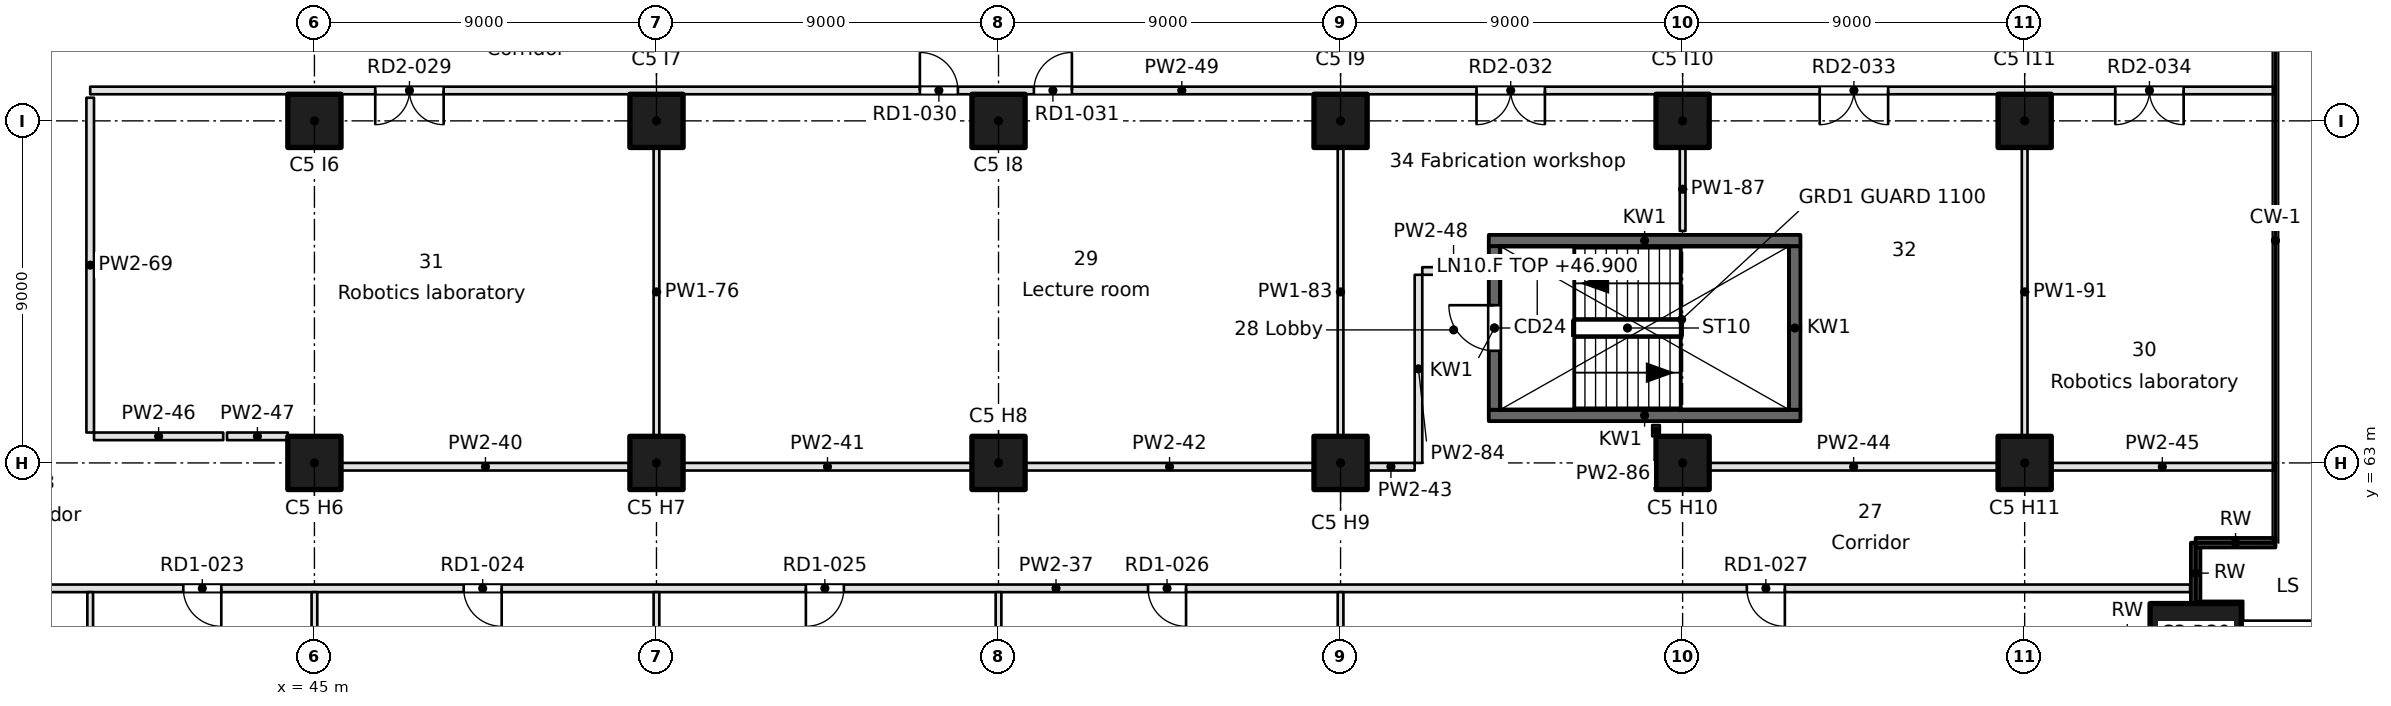
"""IFC4 building model, lengths in metres.
Left out: names, types, materials, properties, quantities, classifications, styles, units other than length and angle.
Written with IfcOpenShell. Run it as: python <this file> out.ifc"""

import sys

from ifc_helpers import new_model, si_unit, direction, frame, frame_2d, origin, origin_2d, place, context, subcontext, project, spatial, rectangle, extrude, element, fill, save


model = new_model("IFC4")
c1 = context("Model", 3, precision=1e-05, world=origin(), true_north=direction((0.0, 1.0)))
c2 = subcontext(c1, "Body", "Model", "MODEL_VIEW")
j1 = project(units=[si_unit("LENGTHUNIT", "METRE"), si_unit("PLANEANGLEUNIT", "RADIAN")], contexts=[c1])
p1 = place(None, origin())
s1 = spatial("IfcSite", under=j1, at=p1, CompositionType="ELEMENT")
p2 = place(p1, origin())
s2 = spatial("IfcBuilding", under=s1, at=p2, CompositionType="ELEMENT")
p3 = place(p2, frame((0.0, 0.0, 46.9)))
s3 = spatial("IfcBuildingStorey", under=s2, at=p3, CompositionType="ELEMENT", Elevation=46.9)
p4 = place(p3, frame((94.5, 58.5, 0.0), z_axis=(0.0, 0.0, 1.0), x_axis=(1.0, 0.0, 0.0)))
e1 = element("IfcColumn", 1, at=p4, inside=s3, PredefinedType="COLUMN", context=c2, shape_type="SweptSolid", body=[
    extrude(rectangle(XDim=2.4, YDim=1.6, at=origin_2d()), origin(), (0.0, 0.0, 1.0), 3.7),
])
for number, where, z_axis, x_axis in (
    (2, (45.0, 63.0, 0.0), (0.0, 0.0, 1.0), (1.0, 0.0, 0.0)),
    (3, (45.0, 72.0, 0.0), (0.0, 0.0, 1.0), (1.0, 0.0, 0.0)),
    (4, (54.0, 63.0, 0.0), (0.0, 0.0, 1.0), (1.0, 0.0, 0.0)),
    (5, (54.0, 72.0, 0.0), (0.0, 0.0, 1.0), (1.0, 0.0, 0.0)),
    (6, (63.0, 63.0, 0.0), (0.0, 0.0, 1.0), (1.0, 0.0, 0.0)),
    (7, (63.0, 72.0, 0.0), (0.0, 0.0, 1.0), (1.0, 0.0, 0.0)),
    (8, (72.0, 63.0, 0.0), (0.0, 0.0, 1.0), (1.0, 0.0, 0.0)),
    (9, (72.0, 72.0, 0.0), (0.0, 0.0, 1.0), (1.0, 0.0, 0.0)),
    (10, (81.0, 63.0, 0.0), (0.0, 0.0, 1.0), (1.0, 0.0, 0.0)),
    (11, (81.0, 72.0, 0.0), (0.0, 0.0, 1.0), (1.0, 0.0, 0.0)),
    (12, (90.0, 63.0, 0.0), (0.0, 0.0, 1.0), (1.0, 0.0, 0.0)),
    (13, (90.0, 72.0, 0.0), (0.0, 0.0, 1.0), (1.0, 0.0, 0.0)),
):
    element("IfcColumn", number, at=place(p3, frame(where, z_axis=z_axis, x_axis=x_axis)), inside=s3, PredefinedType="COLUMN", context=c2, shape_type="SweptSolid", body=[
        extrude(rectangle(XDim=1.4, YDim=1.4, at=origin_2d()), origin(), (0.0, 0.0, 1.0), 3.7),
    ])
p5 = place(p3, frame((94.499, 59.3, 0.0), z_axis=(0.0, 0.0, 1.0), x_axis=(0.00015253203, 0.999999988367, 0.0)))
e14 = element("IfcWall", 14, at=p5, inside=s3, PredefinedType="SOLIDWALL", context=c2, shape_type="SweptSolid", body=[
    extrude(rectangle(XDim=1.601, YDim=0.25, at=frame_2d((0.8, 0.0))), origin(), (0.0, 0.0, 1.0), 3.3),
])
p6 = place(p3, frame((94.499, 60.901, 0.0), z_axis=(0.0, 0.0, 1.0), x_axis=(0.999999993241, 0.00011626555, 0.0)))
e15 = element("IfcWall", 15, at=p6, inside=s3, PredefinedType="SOLIDWALL", context=c2, shape_type="SweptSolid", body=[
    extrude(rectangle(XDim=2.1, YDim=0.25, at=frame_2d((1.05, 0.0))), origin(), (0.0, 0.0, 1.0), 3.3),
])
for number, where, z_axis, x_axis in (
    (16, (75.9, 64.25, -0.4), (0.0, 0.0, 1.0), (1.0, 0.0, 0.0)),
    (17, (75.9, 68.85, -0.4), (0.0, 0.0, 1.0), (1.0, 0.0, 0.0)),
):
    element("IfcWall", number, at=place(p3, frame(where, z_axis=z_axis, x_axis=x_axis)), inside=s3, PredefinedType="SOLIDWALL", context=c2, shape_type="SweptSolid", body=[
        extrude(rectangle(XDim=8.2, YDim=0.3, at=frame_2d((4.1, 0.0))), origin(), (0.0, 0.0, 1.0), 3.7),
    ])
p7 = place(p3, frame((76.05, 64.4, -0.4), z_axis=(0.0, 0.0, 1.0), x_axis=(0.0, 1.0, 0.0)))
e18 = element("IfcWall", 18, at=p7, inside=s3, PredefinedType="SOLIDWALL", context=c2, shape_type="SweptSolid", body=[
    extrude(rectangle(XDim=4.3, YDim=0.3, at=frame_2d((2.15, 0.0))), origin(), (0.0, 0.0, 1.0), 3.7),
])
p8 = place(p7, frame((1.55, 0.0, 0.4)))
e19 = element("IfcOpeningElement", 19, at=p8, cuts=e18, PredefinedType="OPENING", context=c2, shape_type="SweptSolid", body=[
    extrude(rectangle(XDim=1.2, YDim=2.1, at=frame_2d((0.6, 1.05))), frame((0.0, 0.15, 0.0), z_axis=(0.0, -1.0, 0.0), x_axis=(1.0, 0.0, 0.0)), (0.0, 0.0, 1.0), 0.3),
])
p9 = place(p3, frame((83.95, 64.4, -0.4), z_axis=(0.0, 0.0, 1.0), x_axis=(0.0, 1.0, 0.0)))
e20 = element("IfcWall", 20, at=p9, inside=s3, PredefinedType="SOLIDWALL", context=c2, shape_type="SweptSolid", body=[
    extrude(rectangle(XDim=4.3, YDim=0.3, at=frame_2d((2.15, 0.0))), origin(), (0.0, 0.0, 1.0), 3.7),
])
p10 = place(p3, frame((94.354, 59.7, 0.0), z_axis=(0.0, 0.0, 1.0), x_axis=(-1.0, 0.0, 0.0)))
e21 = element("IfcWall", 21, at=p10, inside=s3, PredefinedType="PARTITIONING", context=c2, shape_type="SweptSolid", body=[
    extrude(rectangle(XDim=59.682, YDim=0.2, at=frame_2d((29.841, 0.0))), origin(), (0.0, 0.0, 1.0), 3.3),
])
p11 = place(p10, frame((51.805, 0.0, 0.0)))
e22 = element("IfcOpeningElement", 22, at=p11, cuts=e21, PredefinedType="OPENING", context=c2, shape_type="SweptSolid", body=[
    extrude(rectangle(XDim=1.0, YDim=2.1, at=frame_2d((0.5, 1.05))), frame((0.0, 0.1, 0.0), z_axis=(0.0, -1.0, 0.0), x_axis=(1.0, 0.0, 0.0)), (0.0, 0.0, 1.0), 0.2),
])
p12 = place(p10, frame((44.427, 0.0, 0.0)))
e23 = element("IfcOpeningElement", 23, at=p12, cuts=e21, PredefinedType="OPENING", context=c2, shape_type="SweptSolid", body=[
    extrude(rectangle(XDim=1.0, YDim=2.1, at=frame_2d((0.5, 1.05))), frame((0.0, 0.1, 0.0), z_axis=(0.0, -1.0, 0.0), x_axis=(1.0, 0.0, 0.0)), (0.0, 0.0, 1.0), 0.2),
])
p13 = place(p10, frame((35.423, 0.0, 0.0)))
e24 = element("IfcOpeningElement", 24, at=p13, cuts=e21, PredefinedType="OPENING", context=c2, shape_type="SweptSolid", body=[
    extrude(rectangle(XDim=1.0, YDim=2.1, at=frame_2d((0.5, 1.05))), frame((0.0, 0.1, 0.0), z_axis=(0.0, -1.0, 0.0), x_axis=(1.0, 0.0, 0.0)), (0.0, 0.0, 1.0), 0.2),
])
p14 = place(p10, frame((26.42, 0.0, 0.0)))
e25 = element("IfcOpeningElement", 25, at=p14, cuts=e21, PredefinedType="OPENING", context=c2, shape_type="SweptSolid", body=[
    extrude(rectangle(XDim=1.0, YDim=2.1, at=frame_2d((0.5, 1.05))), frame((0.0, 0.1, 0.0), z_axis=(0.0, -1.0, 0.0), x_axis=(1.0, 0.0, 0.0)), (0.0, 0.0, 1.0), 0.2),
])
p15 = place(p10, frame((10.664, 0.0, 0.0)))
e26 = element("IfcOpeningElement", 26, at=p15, cuts=e21, PredefinedType="OPENING", context=c2, shape_type="SweptSolid", body=[
    extrude(rectangle(XDim=1.0, YDim=2.1, at=frame_2d((0.5, 1.05))), frame((0.0, 0.1, 0.0), z_axis=(0.0, -1.0, 0.0), x_axis=(1.0, 0.0, 0.0)), (0.0, 0.0, 1.0), 0.2),
])
for number, where, z_axis, x_axis in (
    (27, (45.7, 62.9, 0.0), (0.0, 0.0, 1.0), (1.0, 0.0, 0.0)),
    (28, (54.7, 62.9, 0.0), (0.0, 0.0, 1.0), (1.0, 0.0, 0.0)),
    (29, (63.7, 62.9, 0.0), (0.0, 0.0, 1.0), (1.0, 0.0, 0.0)),
):
    element("IfcWall", number, at=place(p3, frame(where, z_axis=z_axis, x_axis=x_axis)), inside=s3, PredefinedType="PARTITIONING", context=c2, shape_type="SweptSolid", body=[
        extrude(rectangle(XDim=7.6, YDim=0.2, at=frame_2d((3.8, 0.0))), origin(), (0.0, 0.0, 1.0), 3.3),
    ])
p16 = place(p3, frame((72.7, 62.9, 0.0), z_axis=(0.0, 0.0, 1.0), x_axis=(1.0, 0.0, 0.0)))
e30 = element("IfcWall", 30, at=p16, inside=s3, PredefinedType="PARTITIONING", context=c2, shape_type="SweptSolid", body=[
    extrude(rectangle(XDim=1.25, YDim=0.2, at=frame_2d((0.625, 0.0))), origin(), (0.0, 0.0, 1.0), 3.3),
])
p17 = place(p3, frame((81.7, 62.9, 0.0), z_axis=(0.0, 0.0, 1.0), x_axis=(1.0, 0.0, 0.0)))
e31 = element("IfcWall", 31, at=p17, inside=s3, PredefinedType="PARTITIONING", context=c2, shape_type="SweptSolid", body=[
    extrude(rectangle(XDim=7.6, YDim=0.2, at=frame_2d((3.8, 0.0))), origin(), (0.0, 0.0, 1.0), 3.3),
])
p18 = place(p3, frame((90.7, 62.9, 0.0), z_axis=(0.0, 0.0, 1.0), x_axis=(1.0, 0.0, 0.0)))
e32 = element("IfcWall", 32, at=p18, inside=s3, PredefinedType="PARTITIONING", context=c2, shape_type="SweptSolid", body=[
    extrude(rectangle(XDim=5.845, YDim=0.2, at=frame_2d((2.922, 0.0))), origin(), (0.0, 0.0, 1.0), 3.3),
])
p19 = place(p3, frame((39.2, 63.7, 0.0), z_axis=(0.0, 0.0, 1.0), x_axis=(1.0, 0.0, 0.0)))
e33 = element("IfcWall", 33, at=p19, inside=s3, PredefinedType="PARTITIONING", context=c2, shape_type="SweptSolid", body=[
    extrude(rectangle(XDim=3.4, YDim=0.2, at=frame_2d((1.7, 0.0))), origin(), (0.0, 0.0, 1.0), 3.3),
])
p20 = place(p3, frame((42.7, 63.7, 0.0), z_axis=(0.0, 0.0, 1.0), x_axis=(1.0, 0.0, 0.0)))
e34 = element("IfcWall", 34, at=p20, inside=s3, PredefinedType="PARTITIONING", context=c2, shape_type="SweptSolid", body=[
    extrude(rectangle(XDim=1.6, YDim=0.2, at=frame_2d((0.8, 0.0))), origin(), (0.0, 0.0, 1.0), 3.3),
])
p21 = place(p3, frame((74.15, 68.05, 0.0), z_axis=(0.0, 0.0, 1.0), x_axis=(1.0, 0.0, 0.0)))
e35 = element("IfcWall", 35, at=p21, inside=s3, PredefinedType="PARTITIONING", context=c2, shape_type="SweptSolid", body=[
    extrude(rectangle(XDim=1.646, YDim=0.2, at=frame_2d((0.823, 0.0))), origin(), (0.0, 0.0, 1.0), 3.3),
])
p22 = place(p3, frame((96.545, 72.8, 0.0), z_axis=(0.0, 0.0, 1.0), x_axis=(-1.0, 0.0, 0.0)))
e36 = element("IfcWall", 36, at=p22, inside=s3, PredefinedType="PARTITIONING", context=c2, shape_type="SweptSolid", body=[
    extrude(rectangle(XDim=57.445, YDim=0.2, at=frame_2d((28.722, 0.0))), origin(), (0.0, 0.0, 1.0), 3.3),
])
p23 = place(p22, frame((48.145, 0.0, 0.0)))
e37 = element("IfcOpeningElement", 37, at=p23, cuts=e36, PredefinedType="OPENING", context=c2, shape_type="SweptSolid", body=[
    extrude(rectangle(XDim=1.8, YDim=2.1, at=frame_2d((0.9, 1.05))), frame((0.0, 0.1, 0.0), z_axis=(0.0, -1.0, 0.0), x_axis=(1.0, 0.0, 0.0)), (0.0, 0.0, 1.0), 0.2),
])
p24 = place(p22, frame((34.614, 0.0, 0.0)))
e38 = element("IfcOpeningElement", 38, at=p24, cuts=e36, PredefinedType="OPENING", context=c2, shape_type="SweptSolid", body=[
    extrude(rectangle(XDim=1.0, YDim=2.1, at=frame_2d((0.5, 1.05))), frame((0.0, 0.1, 0.0), z_axis=(0.0, -1.0, 0.0), x_axis=(1.0, 0.0, 0.0)), (0.0, 0.0, 1.0), 0.2),
])
p25 = place(p22, frame((31.614, 0.0, 0.0)))
e39 = element("IfcOpeningElement", 39, at=p25, cuts=e36, PredefinedType="OPENING", context=c2, shape_type="SweptSolid", body=[
    extrude(rectangle(XDim=1.0, YDim=2.1, at=frame_2d((0.5, 1.05))), frame((0.0, 0.1, 0.0), z_axis=(0.0, -1.0, 0.0), x_axis=(1.0, 0.0, 0.0)), (0.0, 0.0, 1.0), 0.2),
])
p26 = place(p22, frame((19.168, 0.0, 0.0)))
e40 = element("IfcOpeningElement", 40, at=p26, cuts=e36, PredefinedType="OPENING", context=c2, shape_type="SweptSolid", body=[
    extrude(rectangle(XDim=1.8, YDim=2.1, at=frame_2d((0.9, 1.05))), frame((0.0, 0.1, 0.0), z_axis=(0.0, -1.0, 0.0), x_axis=(1.0, 0.0, 0.0)), (0.0, 0.0, 1.0), 0.2),
])
p27 = place(p22, frame((10.137, 0.0, 0.0)))
e41 = element("IfcOpeningElement", 41, at=p27, cuts=e36, PredefinedType="OPENING", context=c2, shape_type="SweptSolid", body=[
    extrude(rectangle(XDim=1.8, YDim=2.1, at=frame_2d((0.9, 1.05))), frame((0.0, 0.1, 0.0), z_axis=(0.0, -1.0, 0.0), x_axis=(1.0, 0.0, 0.0)), (0.0, 0.0, 1.0), 0.2),
])
p28 = place(p22, frame((2.361, 0.0, 0.0)))
e42 = element("IfcOpeningElement", 42, at=p28, cuts=e36, PredefinedType="OPENING", context=c2, shape_type="SweptSolid", body=[
    extrude(rectangle(XDim=1.8, YDim=2.1, at=frame_2d((0.9, 1.05))), frame((0.0, 0.1, 0.0), z_axis=(0.0, -1.0, 0.0), x_axis=(1.0, 0.0, 0.0)), (0.0, 0.0, 1.0), 0.2),
])
p29 = place(p3, frame((39.1, 59.6, 0.0), z_axis=(0.0, 0.0, 1.0), x_axis=(0.0, -1.0, 0.0)))
e43 = element("IfcWall", 43, at=p29, inside=s3, PredefinedType="PARTITIONING", context=c2, shape_type="SweptSolid", body=[
    extrude(rectangle(XDim=5.525, YDim=0.15, at=frame_2d((2.763, 0.0))), origin(), (0.0, 0.0, 1.0), 3.3),
])
p30 = place(p3, frame((39.1, 72.609, 0.0), z_axis=(0.0, 0.0, 1.0), x_axis=(0.0, -1.0, 0.0)))
e44 = element("IfcWall", 44, at=p30, inside=s3, PredefinedType="PARTITIONING", context=c2, shape_type="SweptSolid", body=[
    extrude(rectangle(XDim=8.809, YDim=0.2, at=frame_2d((4.404, 0.0))), origin(), (0.0, 0.0, 1.0), 3.3),
])
for number, where, z_axis, x_axis in (
    (45, (45.0, 59.6, 0.0), (0.0, 0.0, 1.0), (0.0, -1.0, 0.0)),
    (46, (54.0, 59.6, 0.0), (0.0, 0.0, 1.0), (0.0, -1.0, 0.0)),
):
    element("IfcWall", number, at=place(p3, frame(where, z_axis=z_axis, x_axis=x_axis)), inside=s3, PredefinedType="PARTITIONING", context=c2, shape_type="SweptSolid", body=[
        extrude(rectangle(XDim=3.145, YDim=0.15, at=frame_2d((1.573, 0.0))), origin(), (0.0, 0.0, 1.0), 3.3),
    ])
p31 = place(p3, frame((54.0, 71.3, 0.0), z_axis=(0.0, 0.0, 1.0), x_axis=(0.0, -1.0, 0.0)))
e47 = element("IfcWall", 47, at=p31, inside=s3, PredefinedType="PARTITIONING", context=c2, shape_type="SweptSolid", body=[
    extrude(rectangle(XDim=7.6, YDim=0.15, at=frame_2d((3.8, 0.0))), origin(), (0.0, 0.0, 1.0), 3.3),
])
for number, where, z_axis, x_axis in (
    (48, (63.0, 59.6, 0.0), (0.0, 0.0, 1.0), (0.0, -1.0, 0.0)),
    (49, (72.0, 59.6, 0.0), (0.0, 0.0, 1.0), (0.0, -1.0, 0.0)),
):
    element("IfcWall", number, at=place(p3, frame(where, z_axis=z_axis, x_axis=x_axis)), inside=s3, PredefinedType="PARTITIONING", context=c2, shape_type="SweptSolid", body=[
        extrude(rectangle(XDim=3.145, YDim=0.15, at=frame_2d((1.573, 0.0))), origin(), (0.0, 0.0, 1.0), 3.3),
    ])
p32 = place(p3, frame((72.0, 71.3, 0.0), z_axis=(0.0, 0.0, 1.0), x_axis=(0.0, -1.0, 0.0)))
e50 = element("IfcWall", 50, at=p32, inside=s3, PredefinedType="PARTITIONING", context=c2, shape_type="SweptSolid", body=[
    extrude(rectangle(XDim=7.6, YDim=0.15, at=frame_2d((3.8, 0.0))), origin(), (0.0, 0.0, 1.0), 3.3),
])
p33 = place(p3, frame((74.05, 63.0, 0.0), z_axis=(0.0, 0.0, 1.0), x_axis=(0.0, 1.0, 0.0)))
e51 = element("IfcWall", 51, at=p33, inside=s3, PredefinedType="PARTITIONING", context=c2, shape_type="SweptSolid", body=[
    extrude(rectangle(XDim=4.95, YDim=0.2, at=frame_2d((2.475, 0.0))), origin(), (0.0, 0.0, 1.0), 3.3),
])
p34 = place(p3, frame((80.3, 63.996, 0.0), z_axis=(0.0, 0.0, 1.0), x_axis=(0.0, -1.0, 0.0)))
e52 = element("IfcWall", 52, at=p34, inside=s3, PredefinedType="PARTITIONING", context=c2, shape_type="SweptSolid", body=[
    extrude(rectangle(XDim=0.296, YDim=0.2, at=frame_2d((0.148, 0.0))), origin(), (0.0, 0.0, 1.0), 3.3),
])
p35 = place(p3, frame((81.0, 71.3, 0.0), z_axis=(0.0, 0.0, 1.0), x_axis=(0.0, -1.0, 0.0)))
e53 = element("IfcWall", 53, at=p35, inside=s3, PredefinedType="PARTITIONING", context=c2, shape_type="SweptSolid", body=[
    extrude(rectangle(XDim=2.196, YDim=0.15, at=frame_2d((1.098, 0.0))), origin(), (0.0, 0.0, 1.0), 3.3),
])
p36 = place(p3, frame((90.0, 71.3, 0.0), z_axis=(0.0, 0.0, 1.0), x_axis=(0.0, -1.0, 0.0)))
e54 = element("IfcWall", 54, at=p36, inside=s3, PredefinedType="PARTITIONING", context=c2, shape_type="SweptSolid", body=[
    extrude(rectangle(XDim=7.6, YDim=0.15, at=frame_2d((3.8, 0.0))), origin(), (0.0, 0.0, 1.0), 3.3),
])
p37 = place(p8, origin())
e55 = element("IfcDoor", 55, at=p37, inside=s3, OperationType="SINGLE_SWING_RIGHT", PredefinedType="DOOR", context=c2, shape_type="SweptSolid", body=[
    extrude(rectangle(XDim=1.2, YDim=2.1, at=frame_2d((0.6, 1.05))), frame((0.0, 0.025, 0.0), z_axis=(0.0, -1.0, 0.0), x_axis=(1.0, 0.0, 0.0)), (0.0, 0.0, 1.0), 0.05),
])
fill(e19, e55)
p38 = place(p11, origin())
e56 = element("IfcDoor", 56, at=p38, inside=s3, OperationType="SINGLE_SWING_LEFT", PredefinedType="DOOR", context=c2, shape_type="SweptSolid", body=[
    extrude(rectangle(XDim=1.0, YDim=2.1, at=frame_2d((0.5, 1.05))), frame((0.0, 0.025, 0.0), z_axis=(0.0, -1.0, 0.0), x_axis=(1.0, 0.0, 0.0)), (0.0, 0.0, 1.0), 0.05),
])
fill(e22, e56)
p39 = place(p12, origin())
e57 = element("IfcDoor", 57, at=p39, inside=s3, OperationType="SINGLE_SWING_LEFT", PredefinedType="DOOR", context=c2, shape_type="SweptSolid", body=[
    extrude(rectangle(XDim=1.0, YDim=2.1, at=frame_2d((0.5, 1.05))), frame((0.0, 0.025, 0.0), z_axis=(0.0, -1.0, 0.0), x_axis=(1.0, 0.0, 0.0)), (0.0, 0.0, 1.0), 0.05),
])
fill(e23, e57)
p40 = place(p13, origin())
e58 = element("IfcDoor", 58, at=p40, inside=s3, OperationType="SINGLE_SWING_RIGHT", PredefinedType="DOOR", context=c2, shape_type="SweptSolid", body=[
    extrude(rectangle(XDim=1.0, YDim=2.1, at=frame_2d((0.5, 1.05))), frame((0.0, 0.025, 0.0), z_axis=(0.0, -1.0, 0.0), x_axis=(1.0, 0.0, 0.0)), (0.0, 0.0, 1.0), 0.05),
])
fill(e24, e58)
p41 = place(p14, origin())
e59 = element("IfcDoor", 59, at=p41, inside=s3, OperationType="SINGLE_SWING_LEFT", PredefinedType="DOOR", context=c2, shape_type="SweptSolid", body=[
    extrude(rectangle(XDim=1.0, YDim=2.1, at=frame_2d((0.5, 1.05))), frame((0.0, 0.025, 0.0), z_axis=(0.0, -1.0, 0.0), x_axis=(1.0, 0.0, 0.0)), (0.0, 0.0, 1.0), 0.05),
])
fill(e25, e59)
p42 = place(p15, origin())
e60 = element("IfcDoor", 60, at=p42, inside=s3, OperationType="SINGLE_SWING_LEFT", PredefinedType="DOOR", context=c2, shape_type="SweptSolid", body=[
    extrude(rectangle(XDim=1.0, YDim=2.1, at=frame_2d((0.5, 1.05))), frame((0.0, 0.025, 0.0), z_axis=(0.0, -1.0, 0.0), x_axis=(1.0, 0.0, 0.0)), (0.0, 0.0, 1.0), 0.05),
])
fill(e26, e60)
p43 = place(p23, origin())
e61 = element("IfcDoor", 61, at=p43, inside=s3, OperationType="DOUBLE_DOOR_SINGLE_SWING", PredefinedType="DOOR", context=c2, shape_type="SweptSolid", body=[
    extrude(rectangle(XDim=1.8, YDim=2.1, at=frame_2d((0.9, 1.05))), frame((0.0, 0.025, 0.0), z_axis=(0.0, -1.0, 0.0), x_axis=(1.0, 0.0, 0.0)), (0.0, 0.0, 1.0), 0.05),
])
fill(e37, e61)
p44 = place(p24, frame((1.0, 0.0, 0.0), z_axis=(0.0, 0.0, 1.0), x_axis=(-1.0, 0.0, 0.0)))
e62 = element("IfcDoor", 62, at=p44, inside=s3, OperationType="SINGLE_SWING_LEFT", PredefinedType="DOOR", context=c2, shape_type="SweptSolid", body=[
    extrude(rectangle(XDim=1.0, YDim=2.1, at=frame_2d((0.5, 1.05))), frame((0.0, 0.025, 0.0), z_axis=(0.0, -1.0, 0.0), x_axis=(1.0, 0.0, 0.0)), (0.0, 0.0, 1.0), 0.05),
])
fill(e38, e62)
p45 = place(p25, frame((1.0, 0.0, 0.0), z_axis=(0.0, 0.0, 1.0), x_axis=(-1.0, 0.0, 0.0)))
e63 = element("IfcDoor", 63, at=p45, inside=s3, OperationType="SINGLE_SWING_RIGHT", PredefinedType="DOOR", context=c2, shape_type="SweptSolid", body=[
    extrude(rectangle(XDim=1.0, YDim=2.1, at=frame_2d((0.5, 1.05))), frame((0.0, 0.025, 0.0), z_axis=(0.0, -1.0, 0.0), x_axis=(1.0, 0.0, 0.0)), (0.0, 0.0, 1.0), 0.05),
])
fill(e39, e63)
p46 = place(p26, origin())
e64 = element("IfcDoor", 64, at=p46, inside=s3, OperationType="DOUBLE_DOOR_SINGLE_SWING", PredefinedType="DOOR", context=c2, shape_type="SweptSolid", body=[
    extrude(rectangle(XDim=1.8, YDim=2.1, at=frame_2d((0.9, 1.05))), frame((0.0, 0.025, 0.0), z_axis=(0.0, -1.0, 0.0), x_axis=(1.0, 0.0, 0.0)), (0.0, 0.0, 1.0), 0.05),
])
fill(e40, e64)
p47 = place(p27, origin())
e65 = element("IfcDoor", 65, at=p47, inside=s3, OperationType="DOUBLE_DOOR_SINGLE_SWING", PredefinedType="DOOR", context=c2, shape_type="SweptSolid", body=[
    extrude(rectangle(XDim=1.8, YDim=2.1, at=frame_2d((0.9, 1.05))), frame((0.0, 0.025, 0.0), z_axis=(0.0, -1.0, 0.0), x_axis=(1.0, 0.0, 0.0)), (0.0, 0.0, 1.0), 0.05),
])
fill(e41, e65)
p48 = place(p28, origin())
e66 = element("IfcDoor", 66, at=p48, inside=s3, OperationType="DOUBLE_DOOR_SINGLE_SWING", PredefinedType="DOOR", context=c2, shape_type="SweptSolid", body=[
    extrude(rectangle(XDim=1.8, YDim=2.1, at=frame_2d((0.9, 1.05))), frame((0.0, 0.025, 0.0), z_axis=(0.0, -1.0, 0.0), x_axis=(1.0, 0.0, 0.0)), (0.0, 0.0, 1.0), 0.05),
])
fill(e42, e66)
save(model, sys.argv[1])
